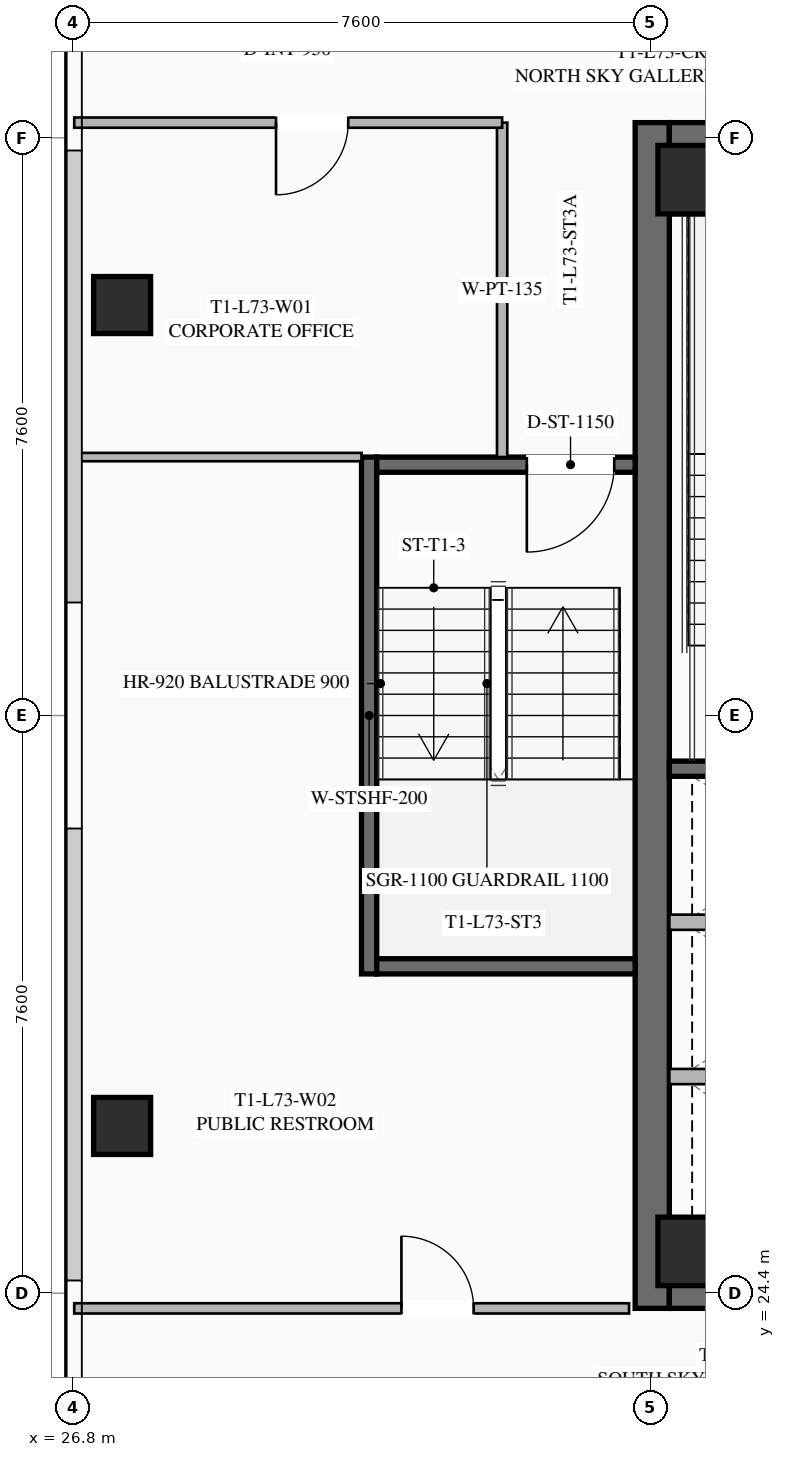
"""IFC4 building model, lengths in metres.
Left out: names, types, materials, properties, quantities, classifications, styles, units other than length and angle.
Written with IfcOpenShell. Run it as: python <this file> out.ifc"""

import sys

from ifc_helpers import new_model, si_unit, direction, frame, frame_2d, origin, origin_2d, place, context, subcontext, project, spatial, rectangle, hollow_rectangle, extrude, element, fill, save


model = new_model("IFC4")
c1 = context("Model", 3, precision=1e-05, world=origin(), true_north=direction((0.0, 1.0)))
c2 = subcontext(c1, "Body", "Model", "MODEL_VIEW")
j1 = project(units=[si_unit("LENGTHUNIT", "METRE"), si_unit("PLANEANGLEUNIT", "RADIAN")], contexts=[c1])
p1 = place(None, origin())
s1 = spatial("IfcSite", under=j1, at=p1, CompositionType="ELEMENT")
p2 = place(p1, origin())
s2 = spatial("IfcBuilding", under=s1, at=p2, CompositionType="ELEMENT")
p3 = place(p2, frame((0.0, 0.0, 270.5)))
s3 = spatial("IfcBuildingStorey", under=s2, at=p3, CompositionType="ELEMENT", Elevation=270.5)
p4 = place(p3, frame((34.425, 24.2, 0.0), z_axis=(0.0, 0.0, 1.0), x_axis=(0.0, 1.0, 0.0)))
e1 = element("IfcWall", 1, at=p4, inside=s3, PredefinedType="SHEAR", context=c2, shape_type="SweptSolid", body=[
    extrude(rectangle(XDim=15.6, YDim=0.45, at=frame_2d((7.8, 0.0))), origin(), (0.0, 0.0, 1.0), 3.55),
])
p5 = place(p3, frame((49.35, 24.425, 0.0), z_axis=(0.0, 0.0, 1.0), x_axis=(-1.0, 0.0, 0.0)))
e2 = element("IfcWall", 2, at=p5, inside=s3, PredefinedType="SHEAR", context=c2, shape_type="SweptSolid", body=[
    extrude(rectangle(XDim=14.7, YDim=0.45, at=frame_2d((7.35, 0.0))), origin(), (0.0, 0.0, 1.0), 3.55),
])
p6 = place(p5, frame((9.05, 0.0, 0.0)))
e3 = element("IfcOpeningElement", 3, at=p6, cuts=e2, PredefinedType="OPENING", context=c2, shape_type="SweptSolid", body=[
    extrude(rectangle(XDim=1.25, YDim=2.25, at=frame_2d((0.625, 1.125))), frame((0.0, 0.235, 0.0), z_axis=(0.0, -1.0, 0.0), x_axis=(1.0, 0.0, 0.0)), (0.0, 0.0, 1.0), 0.47),
])
p7 = place(p5, frame((4.0, 0.0, 0.0)))
e4 = element("IfcOpeningElement", 4, at=p7, cuts=e2, PredefinedType="OPENING", context=c2, shape_type="SweptSolid", body=[
    extrude(rectangle(XDim=1.25, YDim=2.25, at=frame_2d((0.625, 1.125))), frame((0.0, 0.235, 0.0), z_axis=(0.0, -1.0, 0.0), x_axis=(1.0, 0.0, 0.0)), (0.0, 0.0, 1.0), 0.47),
])
p8 = place(p3, frame((34.65, 39.575, 0.0), z_axis=(0.0, 0.0, 1.0), x_axis=(1.0, 0.0, 0.0)))
e5 = element("IfcWall", 5, at=p8, inside=s3, PredefinedType="SHEAR", context=c2, shape_type="SweptSolid", body=[
    extrude(rectangle(XDim=14.7, YDim=0.45, at=frame_2d((7.35, 0.0))), origin(), (0.0, 0.0, 1.0), 3.55),
])
p9 = place(p8, frame((4.4, 0.0, 0.0)))
e6 = element("IfcOpeningElement", 6, at=p9, cuts=e5, PredefinedType="OPENING", context=c2, shape_type="SweptSolid", body=[
    extrude(rectangle(XDim=1.25, YDim=2.25, at=frame_2d((0.625, 1.125))), frame((0.0, 0.235, 0.0), z_axis=(0.0, -1.0, 0.0), x_axis=(1.0, 0.0, 0.0)), (0.0, 0.0, 1.0), 0.47),
])
p10 = place(p8, frame((9.45, 0.0, 0.0)))
e7 = element("IfcOpeningElement", 7, at=p10, cuts=e5, PredefinedType="OPENING", context=c2, shape_type="SweptSolid", body=[
    extrude(rectangle(XDim=1.25, YDim=2.25, at=frame_2d((0.625, 1.125))), frame((0.0, 0.235, 0.0), z_axis=(0.0, -1.0, 0.0), x_axis=(1.0, 0.0, 0.0)), (0.0, 0.0, 1.0), 0.47),
])
for number, where, z_axis, x_axis in (
    (8, (34.95, 24.95, 0.0), (0.0, 0.0, 1.0), (1.0, 0.0, 0.0)),
    (9, (34.95, 39.05, 0.0), (0.0, 0.0, 1.0), (1.0, 0.0, 0.0)),
):
    element("IfcColumn", number, at=place(p3, frame(where, z_axis=z_axis, x_axis=x_axis)), inside=s3, PredefinedType="COLUMN", context=c2, shape_type="SweptSolid", body=[
        extrude(hollow_rectangle(XDim=0.9, YDim=0.9, WallThickness=0.04, at=origin_2d()), origin(), (0.0, 0.0, 1.0), 3.37),
    ])
for number, where, z_axis, x_axis in (
    (10, (27.45, 37.4, 0.0), (0.0, 0.0, 1.0), (1.0, 0.0, 0.0)),
    (11, (27.45, 26.6, 0.0), (0.0, 0.0, 1.0), (1.0, 0.0, 0.0)),
):
    element("IfcColumn", number, at=place(p3, frame(where, z_axis=z_axis, x_axis=x_axis)), inside=s3, PredefinedType="COLUMN", context=c2, shape_type="SweptSolid", body=[
        extrude(hollow_rectangle(XDim=0.75, YDim=0.75, WallThickness=0.032, at=origin_2d()), origin(), (0.0, 0.0, 1.0), 3.37),
    ])
for number, where, z_axis, x_axis in (
    (12, (34.65, 31.3, 0.0), (0.0, 0.0, 1.0), (1.0, 0.0, 0.0)),
    (13, (34.65, 38.7, 0.0), (0.0, 0.0, 1.0), (1.0, 0.0, 0.0)),
):
    element("IfcWall", number, at=place(p3, frame(where, z_axis=z_axis, x_axis=x_axis)), inside=s3, PredefinedType="SHEAR", context=c2, shape_type="SweptSolid", body=[
        extrude(rectangle(XDim=3.65, YDim=0.2, at=frame_2d((1.825, 0.0))), origin(), (0.0, 0.0, 1.0), 3.37),
    ])
for number, where, z_axis, x_axis in (
    (14, (34.65, 27.25, 0.0), (0.0, 0.0, 1.0), (1.0, 0.0, 0.0)),
    (15, (34.65, 29.28, 0.0), (0.0, 0.0, 1.0), (1.0, 0.0, 0.0)),
):
    element("IfcWall", number, at=place(p3, frame(where, z_axis=z_axis, x_axis=x_axis)), inside=s3, PredefinedType="SOLIDWALL", context=c2, shape_type="SweptSolid", body=[
        extrude(rectangle(XDim=3.3, YDim=0.2, at=frame_2d((1.65, 0.0))), origin(), (0.0, 0.0, 1.0), 3.37),
    ])
p11 = place(p3, frame((30.7, 28.6, 0.0), z_axis=(0.0, 0.0, 1.0), x_axis=(0.0, 1.0, 0.0)))
e16 = element("IfcWall", 16, at=p11, inside=s3, PredefinedType="SHEAR", context=c2, shape_type="SweptSolid", body=[
    extrude(rectangle(XDim=6.8, YDim=0.2, at=frame_2d((3.4, 0.0))), origin(), (0.0, 0.0, 1.0), 3.37),
])
p12 = place(p3, frame((34.2, 35.3, 0.0), z_axis=(0.0, 0.0, 1.0), x_axis=(-1.0, 0.0, 0.0)))
e17 = element("IfcWall", 17, at=p12, inside=s3, PredefinedType="SHEAR", context=c2, shape_type="SweptSolid", body=[
    extrude(rectangle(XDim=3.4, YDim=0.2, at=frame_2d((1.7, 0.0))), origin(), (0.0, 0.0, 1.0), 3.37),
])
p13 = place(p12, frame((0.275, 0.0, 0.0)))
e18 = element("IfcOpeningElement", 18, at=p13, cuts=e17, PredefinedType="OPENING", context=c2, shape_type="SweptSolid", body=[
    extrude(rectangle(XDim=1.15, YDim=2.2, at=frame_2d((0.575, 1.1))), frame((0.0, 0.11, 0.0), z_axis=(0.0, -1.0, 0.0), x_axis=(1.0, 0.0, 0.0)), (0.0, 0.0, 1.0), 0.22),
])
p14 = place(p3, frame((30.8, 28.7, 0.0), z_axis=(0.0, 0.0, 1.0), x_axis=(1.0, 0.0, 0.0)))
e19 = element("IfcWall", 19, at=p14, inside=s3, PredefinedType="SHEAR", context=c2, shape_type="SweptSolid", body=[
    extrude(rectangle(XDim=3.4, YDim=0.2, at=frame_2d((1.7, 0.0))), origin(), (0.0, 0.0, 1.0), 3.37),
])
p15 = place(p3, frame((32.45, 35.4, 0.0), z_axis=(0.0, 0.0, 1.0), x_axis=(0.0, 1.0, 0.0)))
e20 = element("IfcWall", 20, at=p15, inside=s3, PredefinedType="PARTITIONING", context=c2, shape_type="SweptSolid", body=[
    extrude(rectangle(XDim=4.4, YDim=0.135, at=frame_2d((2.2, 0.0))), origin(), (0.0, 0.0, 1.0), 2.723),
])
p16 = place(p3, frame((32.45, 39.8, 0.0), z_axis=(0.0, 0.0, 1.0), x_axis=(-1.0, 0.0, 0.0)))
e21 = element("IfcWall", 21, at=p16, inside=s3, PredefinedType="PARTITIONING", context=c2, shape_type="SweptSolid", body=[
    extrude(rectangle(XDim=5.63, YDim=0.135, at=frame_2d((2.815, 0.0))), origin(), (0.0, 0.0, 1.0), 2.723),
])
p17 = place(p16, frame((2.025, 0.0, 0.0)))
e22 = element("IfcOpeningElement", 22, at=p17, cuts=e21, PredefinedType="OPENING", context=c2, shape_type="SweptSolid", body=[
    extrude(rectangle(XDim=0.95, YDim=2.05, at=frame_2d((0.475, 1.025))), frame((0.0, 0.077, 0.0), z_axis=(0.0, -1.0, 0.0), x_axis=(1.0, 0.0, 0.0)), (0.0, 0.0, 1.0), 0.155),
])
p18 = place(p3, frame((26.82, 24.2, 0.0), z_axis=(0.0, 0.0, 1.0), x_axis=(1.0, 0.0, 0.0)))
e23 = element("IfcWall", 23, at=p18, inside=s3, PredefinedType="PARTITIONING", context=c2, shape_type="SweptSolid", body=[
    extrude(rectangle(XDim=7.3, YDim=0.135, at=frame_2d((3.65, 0.0))), origin(), (0.0, 0.0, 1.0), 2.723),
])
p19 = place(p18, frame((4.305, 0.0, 0.0)))
e24 = element("IfcOpeningElement", 24, at=p19, cuts=e23, PredefinedType="OPENING", context=c2, shape_type="SweptSolid", body=[
    extrude(rectangle(XDim=0.95, YDim=2.05, at=frame_2d((0.475, 1.025))), frame((0.0, 0.077, 0.0), z_axis=(0.0, -1.0, 0.0), x_axis=(1.0, 0.0, 0.0)), (0.0, 0.0, 1.0), 0.155),
])
p20 = place(p3, frame((30.6, 35.4, 0.0), z_axis=(0.0, 0.0, 1.0), x_axis=(-1.0, 0.0, 0.0)))
e25 = element("IfcWall", 25, at=p20, inside=s3, PredefinedType="PARTITIONING", context=c2, shape_type="SweptSolid", body=[
    extrude(rectangle(XDim=3.78, YDim=0.11, at=frame_2d((1.89, 0.0))), origin(), (0.0, 0.0, 1.0), 2.723),
])
p21 = place(p13, origin())
e26 = element("IfcDoor", 26, at=p21, inside=s3, OperationType="SINGLE_SWING_RIGHT", PredefinedType="DOOR", context=c2, shape_type="SweptSolid", body=[
    extrude(rectangle(XDim=1.15, YDim=2.2, at=frame_2d((0.575, 1.1))), frame((0.0, 0.025, 0.0), z_axis=(0.0, -1.0, 0.0), x_axis=(1.0, 0.0, 0.0)), (0.0, 0.0, 1.0), 0.05),
])
fill(e18, e26)
p22 = place(p17, origin())
e27 = element("IfcDoor", 27, at=p22, inside=s3, OperationType="SINGLE_SWING_RIGHT", PredefinedType="DOOR", context=c2, shape_type="SweptSolid", body=[
    extrude(rectangle(XDim=0.95, YDim=2.05, at=frame_2d((0.475, 1.025))), frame((0.0, 0.025, 0.0), z_axis=(0.0, -1.0, 0.0), x_axis=(1.0, 0.0, 0.0)), (0.0, 0.0, 1.0), 0.05),
])
fill(e22, e27)
p23 = place(p19, origin())
e28 = element("IfcDoor", 28, at=p23, inside=s3, OperationType="SINGLE_SWING_LEFT", PredefinedType="DOOR", context=c2, shape_type="SweptSolid", body=[
    extrude(rectangle(XDim=0.95, YDim=2.05, at=frame_2d((0.475, 1.025))), frame((0.0, 0.025, 0.0), z_axis=(0.0, -1.0, 0.0), x_axis=(1.0, 0.0, 0.0)), (0.0, 0.0, 1.0), 0.05),
])
fill(e24, e28)
save(model, sys.argv[1])
